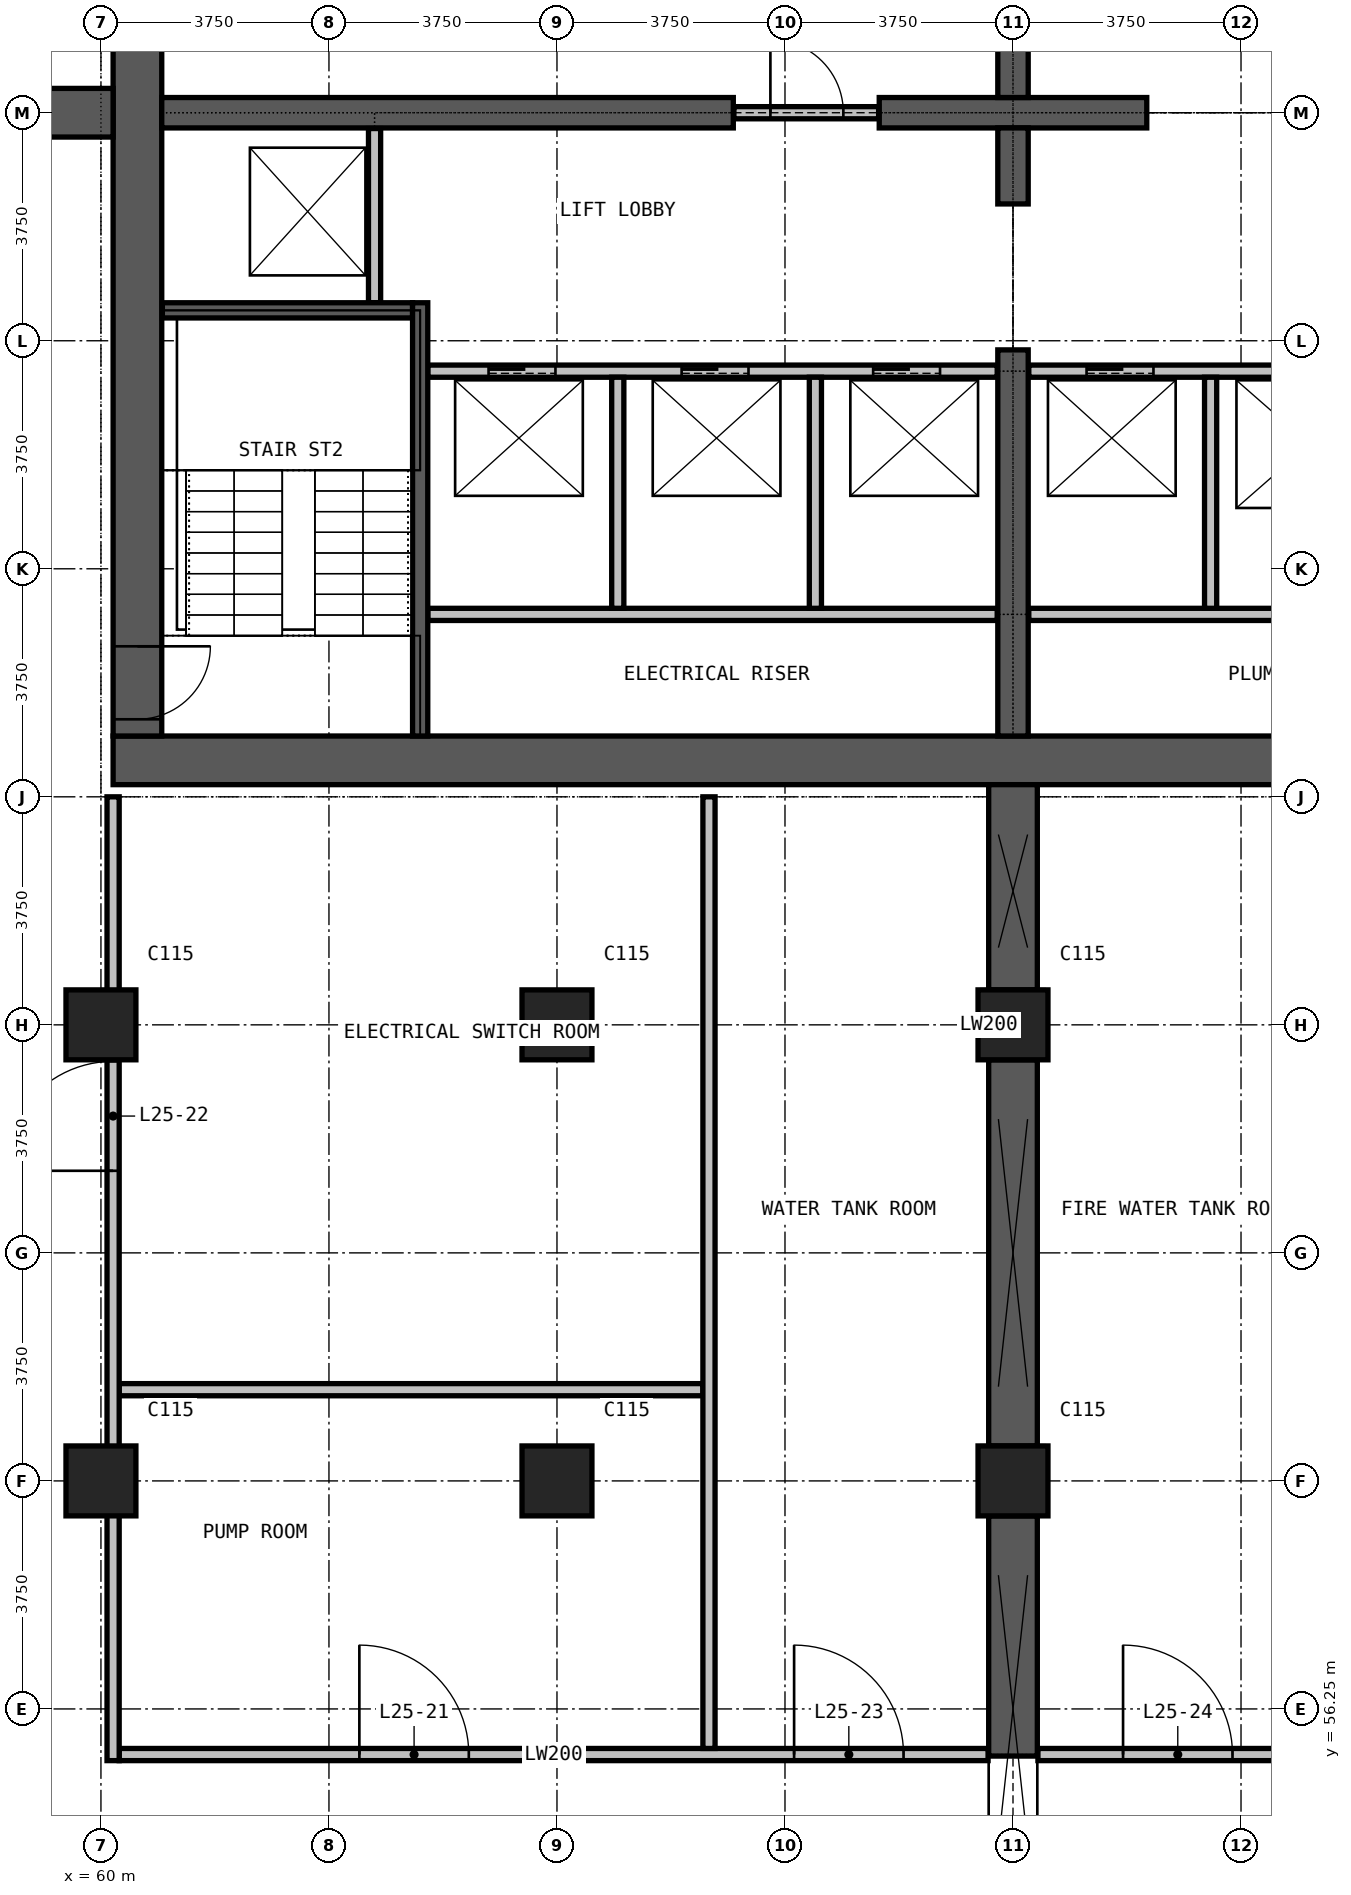
"""IFC4 building model, lengths in metres.
Left out: names, types, materials, properties, quantities, classifications, styles, units other than length and angle.
Written with IfcOpenShell. Run it as: python <this file> out.ifc"""

import sys

from ifc_helpers import new_model, si_unit, direction, frame, frame_2d, origin, origin_2d, place, context, subcontext, project, spatial, rectangle, extrude, element, fill, save


model = new_model("IFC4")
c1 = context("Model", 3, precision=1e-05, world=origin(), true_north=direction((0.0, 1.0)))
c2 = subcontext(c1, "Body", "Model", "MODEL_VIEW")
j1 = project(units=[si_unit("LENGTHUNIT", "METRE"), si_unit("PLANEANGLEUNIT", "RADIAN")], contexts=[c1])
p1 = place(None, origin())
s1 = spatial("IfcSite", under=j1, at=p1, CompositionType="ELEMENT")
p2 = place(p1, origin())
s2 = spatial("IfcBuilding", under=s1, at=p2, CompositionType="ELEMENT")
p3 = place(p2, frame((0.0, 0.0, 102.2)))
s3 = spatial("IfcBuildingStorey", under=s2, at=p3, CompositionType="ELEMENT", Elevation=102.2)
for number, where, z_axis, x_axis in (
    (1, (60.0, 60.0, 0.0), (0.0, 0.0, 1.0), (1.0, 0.0, 0.0)),
    (2, (60.0, 67.5, 0.0), (0.0, 0.0, 1.0), (1.0, 0.0, 0.0)),
    (3, (67.5, 60.0, 0.0), (0.0, 0.0, 1.0), (1.0, 0.0, 0.0)),
    (4, (67.5, 67.5, 0.0), (0.0, 0.0, 1.0), (1.0, 0.0, 0.0)),
    (5, (75.0, 60.0, 0.0), (0.0, 0.0, 1.0), (1.0, 0.0, 0.0)),
    (6, (75.0, 67.5, 0.0), (0.0, 0.0, 1.0), (1.0, 0.0, 0.0)),
):
    element("IfcColumn", number, at=place(p3, frame(where, z_axis=z_axis, x_axis=x_axis)), inside=s3, PredefinedType="COLUMN", context=c2, shape_type="SweptSolid", body=[
        extrude(rectangle(XDim=1.15, YDim=1.15, at=origin_2d()), origin(), (0.0, 0.0, 1.0), 5.0),
    ])
p4 = place(p3, frame((60.2, 71.85, 0.0), z_axis=(0.0, 0.0, 1.0), x_axis=(1.0, 0.0, 0.0)))
e7 = element("IfcWall", 7, at=p4, inside=s3, PredefinedType="SHEAR", context=c2, shape_type="SweptSolid", body=[
    extrude(rectangle(XDim=29.6, YDim=0.8, at=frame_2d((14.8, 0.0))), origin(), (0.0, 0.0, 1.0), 5.0),
])
p5 = place(p3, frame((60.6, 92.75, 0.0), z_axis=(0.0, 0.0, 1.0), x_axis=(0.0, -1.0, 0.0)))
e8 = element("IfcWall", 8, at=p5, inside=s3, PredefinedType="SHEAR", context=c2, shape_type="SweptSolid", body=[
    extrude(rectangle(XDim=20.5, YDim=0.8, at=frame_2d((10.25, 0.0))), origin(), (0.0, 0.0, 1.0), 5.0),
])
p6 = place(p5, frame((19.025, 0.0, 0.0)))
e9 = element("IfcOpeningElement", 9, at=p6, cuts=e8, PredefinedType="OPENING", context=c2, shape_type="SweptSolid", body=[
    extrude(rectangle(XDim=1.2, YDim=2.2, at=frame_2d((0.6, 1.1))), frame((0.0, 0.41, 0.0), z_axis=(0.0, -1.0, 0.0), x_axis=(1.0, 0.0, 0.0)), (0.0, 0.0, 1.0), 0.82),
])
p7 = place(p5, frame((8.025, 0.0, 0.0)))
e10 = element("IfcOpeningElement", 10, at=p7, cuts=e8, PredefinedType="OPENING", context=c2, shape_type="SweptSolid", body=[
    extrude(rectangle(XDim=1.2, YDim=2.2, at=frame_2d((0.6, 1.1))), frame((0.0, 0.41, 0.0), z_axis=(0.0, -1.0, 0.0), x_axis=(1.0, 0.0, 0.0)), (0.0, 0.0, 1.0), 0.82),
])
p8 = place(p3, frame((61.0, 82.5, 0.0), z_axis=(0.0, 0.0, 1.0), x_axis=(1.0, 0.0, 0.0)))
e11 = element("IfcWall", 11, at=p8, inside=s3, PredefinedType="SHEAR", context=c2, shape_type="SweptSolid", body=[
    extrude(rectangle(XDim=9.4, YDim=0.5, at=frame_2d((4.7, 0.0))), origin(), (0.0, 0.0, 1.0), 5.0),
])
p9 = place(p3, frame((72.8, 82.5, 0.0), z_axis=(0.0, 0.0, 1.0), x_axis=(1.0, 0.0, 0.0)))
e12 = element("IfcWall", 12, at=p9, inside=s3, PredefinedType="SHEAR", context=c2, shape_type="SweptSolid", body=[
    extrude(rectangle(XDim=4.4, YDim=0.5, at=frame_2d((2.2, 0.0))), origin(), (0.0, 0.0, 1.0), 5.0),
])
p10 = place(p3, frame((75.0, 72.25, 0.0), z_axis=(0.0, 0.0, 1.0), x_axis=(0.0, 1.0, 0.0)))
e13 = element("IfcWall", 13, at=p10, inside=s3, PredefinedType="SHEAR", context=c2, shape_type="SweptSolid", body=[
    extrude(rectangle(XDim=6.35, YDim=0.5, at=frame_2d((3.175, 0.0))), origin(), (0.0, 0.0, 1.0), 5.0),
])
for number, where, z_axis, x_axis in (
    (14, (75.0, 81.0, 0.0), (0.0, 0.0, 1.0), (0.0, 1.0, 0.0)),
    (15, (75.0, 82.75, 0.0), (0.0, 0.0, 1.0), (0.0, 1.0, 0.0)),
):
    element("IfcWall", number, at=place(p3, frame(where, z_axis=z_axis, x_axis=x_axis)), inside=s3, PredefinedType="SHEAR", context=c2, shape_type="SweptSolid", body=[
        extrude(rectangle(XDim=1.25, YDim=0.5, at=frame_2d((0.625, 0.0))), origin(), (0.0, 0.0, 1.0), 5.0),
    ])
p11 = place(p3, frame((57.875, 82.5, 0.0), z_axis=(0.0, 0.0, 1.0), x_axis=(1.0, 0.0, 0.0)))
e16 = element("IfcWall", 16, at=p11, inside=s3, PredefinedType="SHEAR", context=c2, shape_type="SweptSolid", body=[
    extrude(rectangle(XDim=2.325, YDim=0.8, at=frame_2d((1.163, 0.0))), origin(), (0.0, 0.0, 1.0), 4.7),
])
p12 = place(p3, frame((75.0, 55.475, 0.0), z_axis=(0.0, 0.0, 1.0), x_axis=(0.0, 1.0, 0.0)))
e17 = element("IfcWall", 17, at=p12, inside=s3, PredefinedType="SHEAR", context=c2, shape_type="SweptSolid", body=[
    extrude(rectangle(XDim=3.95, YDim=0.8, at=frame_2d((1.975, 0.0))), origin(), (0.0, 0.0, 1.0), 4.7),
])
p13 = place(p3, frame((75.0, 60.575, 0.0), z_axis=(0.0, 0.0, 1.0), x_axis=(0.0, 1.0, 0.0)))
e18 = element("IfcWall", 18, at=p13, inside=s3, PredefinedType="SHEAR", context=c2, shape_type="SweptSolid", body=[
    extrude(rectangle(XDim=6.35, YDim=0.8, at=frame_2d((3.175, 0.0))), origin(), (0.0, 0.0, 1.0), 4.7),
])
p14 = place(p3, frame((75.0, 68.075, 0.0), z_axis=(0.0, 0.0, 1.0), x_axis=(0.0, 1.0, 0.0)))
e19 = element("IfcWall", 19, at=p14, inside=s3, PredefinedType="SHEAR", context=c2, shape_type="SweptSolid", body=[
    extrude(rectangle(XDim=3.375, YDim=0.8, at=frame_2d((1.688, 0.0))), origin(), (0.0, 0.0, 1.0), 4.7),
])
p15 = place(p3, frame((60.3, 55.5, 0.0), z_axis=(0.0, 0.0, 1.0), x_axis=(1.0, 0.0, 0.0)))
e20 = element("IfcWall", 20, at=p15, inside=s3, PredefinedType="PARTITIONING", context=c2, shape_type="SweptSolid", body=[
    extrude(rectangle(XDim=14.29, YDim=0.2, at=frame_2d((7.145, 0.0))), origin(), (0.0, 0.0, 1.0), 4.7),
])
p16 = place(p15, frame((3.95, 0.0, 0.0)))
e21 = element("IfcOpeningElement", 21, at=p16, cuts=e20, PredefinedType="OPENING", context=c2, shape_type="SweptSolid", body=[
    extrude(rectangle(XDim=1.8, YDim=2.4, at=frame_2d((0.9, 1.2))), frame((0.0, 0.11, 0.0), z_axis=(0.0, -1.0, 0.0), x_axis=(1.0, 0.0, 0.0)), (0.0, 0.0, 1.0), 0.22),
])
p17 = place(p15, frame((11.1, 0.0, 0.0)))
e22 = element("IfcOpeningElement", 22, at=p17, cuts=e20, PredefinedType="OPENING", context=c2, shape_type="SweptSolid", body=[
    extrude(rectangle(XDim=1.8, YDim=2.4, at=frame_2d((0.9, 1.2))), frame((0.0, 0.11, 0.0), z_axis=(0.0, -1.0, 0.0), x_axis=(1.0, 0.0, 0.0)), (0.0, 0.0, 1.0), 0.22),
])
p18 = place(p3, frame((75.41, 55.5, 0.0), z_axis=(0.0, 0.0, 1.0), x_axis=(1.0, 0.0, 0.0)))
e23 = element("IfcWall", 23, at=p18, inside=s3, PredefinedType="PARTITIONING", context=c2, shape_type="SweptSolid", body=[
    extrude(rectangle(XDim=14.29, YDim=0.2, at=frame_2d((7.145, 0.0))), origin(), (0.0, 0.0, 1.0), 4.7),
])
p19 = place(p18, frame((1.4, 0.0, 0.0)))
e24 = element("IfcOpeningElement", 24, at=p19, cuts=e23, PredefinedType="OPENING", context=c2, shape_type="SweptSolid", body=[
    extrude(rectangle(XDim=1.8, YDim=2.4, at=frame_2d((0.9, 1.2))), frame((0.0, 0.11, 0.0), z_axis=(0.0, -1.0, 0.0), x_axis=(1.0, 0.0, 0.0)), (0.0, 0.0, 1.0), 0.22),
])
p20 = place(p18, frame((8.54, 0.0, 0.0)))
e25 = element("IfcOpeningElement", 25, at=p20, cuts=e23, PredefinedType="OPENING", context=c2, shape_type="SweptSolid", body=[
    extrude(rectangle(XDim=1.8, YDim=2.4, at=frame_2d((0.9, 1.2))), frame((0.0, 0.11, 0.0), z_axis=(0.0, -1.0, 0.0), x_axis=(1.0, 0.0, 0.0)), (0.0, 0.0, 1.0), 0.22),
])
p21 = place(p3, frame((60.3, 61.5, 0.0), z_axis=(0.0, 0.0, 1.0), x_axis=(1.0, 0.0, 0.0)))
e26 = element("IfcWall", 26, at=p21, inside=s3, PredefinedType="PARTITIONING", context=c2, shape_type="SweptSolid", body=[
    extrude(rectangle(XDim=9.6, YDim=0.2, at=frame_2d((4.8, 0.0))), origin(), (0.0, 0.0, 1.0), 4.7),
])
p22 = place(p3, frame((70.41, 82.5, 0.0), z_axis=(0.0, 0.0, 1.0), x_axis=(1.0, 0.0, 0.0)))
e27 = element("IfcWall", 27, at=p22, inside=s3, PredefinedType="PARTITIONING", context=c2, shape_type="SweptSolid", body=[
    extrude(rectangle(XDim=2.38, YDim=0.2, at=frame_2d((1.19, 0.0))), origin(), (0.0, 0.0, 1.0), 2.4),
])
p23 = place(p22, frame((0.6, 0.0, 0.0)))
e28 = element("IfcOpeningElement", 28, at=p23, cuts=e27, PredefinedType="OPENING", context=c2, shape_type="SweptSolid", body=[
    extrude(rectangle(XDim=1.2, YDim=2.2, at=frame_2d((0.6, 1.1))), frame((0.0, 0.11, 0.0), z_axis=(0.0, -1.0, 0.0), x_axis=(1.0, 0.0, 0.0)), (0.0, 0.0, 1.0), 0.22),
])
p24 = place(p3, frame((60.2, 55.4, 0.0), z_axis=(0.0, 0.0, 1.0), x_axis=(0.0, 1.0, 0.0)))
e29 = element("IfcWall", 29, at=p24, inside=s3, PredefinedType="PARTITIONING", context=c2, shape_type="SweptSolid", body=[
    extrude(rectangle(XDim=15.85, YDim=0.2, at=frame_2d((7.925, 0.0))), origin(), (0.0, 0.0, 1.0), 4.7),
])
p25 = place(p24, frame((9.7, 0.0, 0.0)))
e30 = element("IfcOpeningElement", 30, at=p25, cuts=e29, PredefinedType="OPENING", context=c2, shape_type="SweptSolid", body=[
    extrude(rectangle(XDim=1.8, YDim=2.4, at=frame_2d((0.9, 1.2))), frame((0.0, 0.11, 0.0), z_axis=(0.0, -1.0, 0.0), x_axis=(1.0, 0.0, 0.0)), (0.0, 0.0, 1.0), 0.22),
])
p26 = place(p3, frame((70.0, 55.6, 0.0), z_axis=(0.0, 0.0, 1.0), x_axis=(0.0, 1.0, 0.0)))
e31 = element("IfcWall", 31, at=p26, inside=s3, PredefinedType="PARTITIONING", context=c2, shape_type="SweptSolid", body=[
    extrude(rectangle(XDim=15.65, YDim=0.2, at=frame_2d((7.825, 0.0))), origin(), (0.0, 0.0, 1.0), 4.7),
])
for number, where, z_axis, x_axis in (
    (32, (74.6, 59.435, 0.0), (0.0, 0.0, 1.0), (0.0, 1.0, 0.0)),
    (33, (74.6, 66.935, 0.0), (0.0, 0.0, 1.0), (0.0, 1.0, 0.0)),
    (34, (75.4, 59.435, 0.0), (0.0, 0.0, 1.0), (0.0, 1.0, 0.0)),
    (35, (75.4, 66.935, 0.0), (0.0, 0.0, 1.0), (0.0, 1.0, 0.0)),
):
    element("IfcWall", number, at=place(p3, frame(where, z_axis=z_axis, x_axis=x_axis)), inside=s3, PredefinedType="PARTITIONING", context=c2, shape_type="SweptSolid", body=[
        extrude(rectangle(XDim=1.13, YDim=0.2, at=frame_2d((0.565, 0.0))), origin(), (0.0, 0.0, 1.0), 4.7),
    ])
for number, where, z_axis, x_axis in (
    (36, (65.375, 74.25, 0.0), (0.0, 0.0, 1.0), (1.0, 0.0, 0.0)),
    (37, (75.26, 74.25, 0.0), (0.0, 0.0, 1.0), (1.0, 0.0, 0.0)),
):
    element("IfcWall", number, at=place(p3, frame(where, z_axis=z_axis, x_axis=x_axis)), inside=s3, PredefinedType="PARTITIONING", context=c2, shape_type="SweptSolid", body=[
        extrude(rectangle(XDim=9.365, YDim=0.2, at=frame_2d((4.683, 0.0))), origin(), (0.0, 0.0, 1.0), 4.7),
    ])
p27 = place(p3, frame((65.375, 78.25, 0.0), z_axis=(0.0, 0.0, 1.0), x_axis=(1.0, 0.0, 0.0)))
e38 = element("IfcWall", 38, at=p27, inside=s3, PredefinedType="PARTITIONING", context=c2, shape_type="SweptSolid", body=[
    extrude(rectangle(XDim=9.365, YDim=0.2, at=frame_2d((4.683, 0.0))), origin(), (0.0, 0.0, 1.0), 4.7),
])
p28 = place(p27, frame((1.0, 0.0, 0.0)))
e39 = element("IfcOpeningElement", 39, at=p28, cuts=e38, PredefinedType="OPENING", context=c2, shape_type="SweptSolid", body=[
    extrude(rectangle(XDim=1.1, YDim=2.2, at=frame_2d((0.55, 1.1))), frame((0.0, 0.11, 0.0), z_axis=(0.0, -1.0, 0.0), x_axis=(1.0, 0.0, 0.0)), (0.0, 0.0, 1.0), 0.22),
])
p29 = place(p27, frame((4.175, 0.0, 0.0)))
e40 = element("IfcOpeningElement", 40, at=p29, cuts=e38, PredefinedType="OPENING", context=c2, shape_type="SweptSolid", body=[
    extrude(rectangle(XDim=1.1, YDim=2.2, at=frame_2d((0.55, 1.1))), frame((0.0, 0.11, 0.0), z_axis=(0.0, -1.0, 0.0), x_axis=(1.0, 0.0, 0.0)), (0.0, 0.0, 1.0), 0.22),
])
p30 = place(p27, frame((7.325, 0.0, 0.0)))
e41 = element("IfcOpeningElement", 41, at=p30, cuts=e38, PredefinedType="OPENING", context=c2, shape_type="SweptSolid", body=[
    extrude(rectangle(XDim=1.1, YDim=2.2, at=frame_2d((0.55, 1.1))), frame((0.0, 0.11, 0.0), z_axis=(0.0, -1.0, 0.0), x_axis=(1.0, 0.0, 0.0)), (0.0, 0.0, 1.0), 0.22),
])
p31 = place(p3, frame((75.26, 78.25, 0.0), z_axis=(0.0, 0.0, 1.0), x_axis=(1.0, 0.0, 0.0)))
e42 = element("IfcWall", 42, at=p31, inside=s3, PredefinedType="PARTITIONING", context=c2, shape_type="SweptSolid", body=[
    extrude(rectangle(XDim=9.365, YDim=0.2, at=frame_2d((4.683, 0.0))), origin(), (0.0, 0.0, 1.0), 4.7),
])
p32 = place(p31, frame((0.95, 0.0, 0.0)))
e43 = element("IfcOpeningElement", 43, at=p32, cuts=e42, PredefinedType="OPENING", context=c2, shape_type="SweptSolid", body=[
    extrude(rectangle(XDim=1.1, YDim=2.2, at=frame_2d((0.55, 1.1))), frame((0.0, 0.11, 0.0), z_axis=(0.0, -1.0, 0.0), x_axis=(1.0, 0.0, 0.0)), (0.0, 0.0, 1.0), 0.22),
])
p33 = place(p3, frame((64.5, 79.375, 0.0), z_axis=(0.0, 0.0, 1.0), x_axis=(0.0, 1.0, 0.0)))
e44 = element("IfcWall", 44, at=p33, inside=s3, PredefinedType="PARTITIONING", context=c2, shape_type="SweptSolid", body=[
    extrude(rectangle(XDim=2.865, YDim=0.2, at=frame_2d((1.433, 0.0))), origin(), (0.0, 0.0, 1.0), 4.7),
])
for number, where, z_axis, x_axis in (
    (45, (68.5, 74.35, 0.0), (0.0, 0.0, 1.0), (0.0, 1.0, 0.0)),
    (46, (71.75, 74.35, 0.0), (0.0, 0.0, 1.0), (0.0, 1.0, 0.0)),
    (47, (78.25, 74.35, 0.0), (0.0, 0.0, 1.0), (0.0, 1.0, 0.0)),
):
    element("IfcWall", number, at=place(p3, frame(where, z_axis=z_axis, x_axis=x_axis)), inside=s3, PredefinedType="PARTITIONING", context=c2, shape_type="SweptSolid", body=[
        extrude(rectangle(XDim=3.8, YDim=0.2, at=frame_2d((1.9, 0.0))), origin(), (0.0, 0.0, 1.0), 4.7),
    ])
p34 = place(p3, frame((61.01, 79.25, 0.0), z_axis=(0.0, 0.0, 1.0), x_axis=(1.0, 0.0, 0.0)))
e48 = element("IfcWall", 48, at=p34, inside=s3, PredefinedType="PARTITIONING", context=c2, shape_type="SweptSolid", body=[
    extrude(rectangle(XDim=4.115, YDim=0.25, at=frame_2d((2.058, 0.0))), origin(), (0.0, 0.0, 1.0), 4.7),
])
p35 = place(p3, frame((65.25, 72.25, 0.0), z_axis=(0.0, 0.0, 1.0), x_axis=(0.0, 1.0, 0.0)))
e49 = element("IfcWall", 49, at=p35, inside=s3, PredefinedType="PARTITIONING", context=c2, shape_type="SweptSolid", body=[
    extrude(rectangle(XDim=7.125, YDim=0.25, at=frame_2d((3.562, 0.0))), origin(), (0.0, 0.0, 1.0), 4.7),
])
p36 = place(p28, origin())
e50 = element("IfcDoor", 50, at=p36, inside=s3, OperationType="DOUBLE_DOOR_SLIDING", PredefinedType="DOOR", context=c2, shape_type="SweptSolid", body=[
    extrude(rectangle(XDim=1.1, YDim=2.2, at=frame_2d((0.55, 1.1))), frame((0.0, 0.025, 0.0), z_axis=(0.0, -1.0, 0.0), x_axis=(1.0, 0.0, 0.0)), (0.0, 0.0, 1.0), 0.05),
])
fill(e39, e50)
p37 = place(p29, origin())
e51 = element("IfcDoor", 51, at=p37, inside=s3, OperationType="DOUBLE_DOOR_SLIDING", PredefinedType="DOOR", context=c2, shape_type="SweptSolid", body=[
    extrude(rectangle(XDim=1.1, YDim=2.2, at=frame_2d((0.55, 1.1))), frame((0.0, 0.025, 0.0), z_axis=(0.0, -1.0, 0.0), x_axis=(1.0, 0.0, 0.0)), (0.0, 0.0, 1.0), 0.05),
])
fill(e40, e51)
p38 = place(p30, origin())
e52 = element("IfcDoor", 52, at=p38, inside=s3, OperationType="DOUBLE_DOOR_SLIDING", PredefinedType="DOOR", context=c2, shape_type="SweptSolid", body=[
    extrude(rectangle(XDim=1.1, YDim=2.2, at=frame_2d((0.55, 1.1))), frame((0.0, 0.025, 0.0), z_axis=(0.0, -1.0, 0.0), x_axis=(1.0, 0.0, 0.0)), (0.0, 0.0, 1.0), 0.05),
])
fill(e41, e52)
p39 = place(p32, origin())
e53 = element("IfcDoor", 53, at=p39, inside=s3, OperationType="DOUBLE_DOOR_SLIDING", PredefinedType="DOOR", context=c2, shape_type="SweptSolid", body=[
    extrude(rectangle(XDim=1.1, YDim=2.2, at=frame_2d((0.55, 1.1))), frame((0.0, 0.025, 0.0), z_axis=(0.0, -1.0, 0.0), x_axis=(1.0, 0.0, 0.0)), (0.0, 0.0, 1.0), 0.05),
])
fill(e43, e53)
p40 = place(p23, origin())
e54 = element("IfcDoor", 54, at=p40, inside=s3, OperationType="SINGLE_SWING_LEFT", PredefinedType="DOOR", context=c2, shape_type="SweptSolid", body=[
    extrude(rectangle(XDim=1.2, YDim=2.2, at=frame_2d((0.6, 1.1))), frame((0.0, 0.025, 0.0), z_axis=(0.0, -1.0, 0.0), x_axis=(1.0, 0.0, 0.0)), (0.0, 0.0, 1.0), 0.05),
])
fill(e28, e54)
p41 = place(p6, origin())
e55 = element("IfcDoor", 55, at=p41, inside=s3, OperationType="SINGLE_SWING_LEFT", PredefinedType="DOOR", context=c2, shape_type="SweptSolid", body=[
    extrude(rectangle(XDim=1.2, YDim=2.2, at=frame_2d((0.6, 1.1))), frame((0.0, 0.025, 0.0), z_axis=(0.0, -1.0, 0.0), x_axis=(1.0, 0.0, 0.0)), (0.0, 0.0, 1.0), 0.05),
])
fill(e9, e55)
p42 = place(p16, origin())
e56 = element("IfcDoor", 56, at=p42, inside=s3, OperationType="DOUBLE_DOOR_SINGLE_SWING", PredefinedType="DOOR", context=c2, shape_type="SweptSolid", body=[
    extrude(rectangle(XDim=1.8, YDim=2.4, at=frame_2d((0.9, 1.2))), frame((0.0, 0.025, 0.0), z_axis=(0.0, -1.0, 0.0), x_axis=(1.0, 0.0, 0.0)), (0.0, 0.0, 1.0), 0.05),
])
fill(e21, e56)
p43 = place(p25, origin())
e57 = element("IfcDoor", 57, at=p43, inside=s3, OperationType="DOUBLE_DOOR_SINGLE_SWING", PredefinedType="DOOR", context=c2, shape_type="SweptSolid", body=[
    extrude(rectangle(XDim=1.8, YDim=2.4, at=frame_2d((0.9, 1.2))), frame((0.0, 0.025, 0.0), z_axis=(0.0, -1.0, 0.0), x_axis=(1.0, 0.0, 0.0)), (0.0, 0.0, 1.0), 0.05),
])
fill(e30, e57)
p44 = place(p17, origin())
e58 = element("IfcDoor", 58, at=p44, inside=s3, OperationType="DOUBLE_DOOR_SINGLE_SWING", PredefinedType="DOOR", context=c2, shape_type="SweptSolid", body=[
    extrude(rectangle(XDim=1.8, YDim=2.4, at=frame_2d((0.9, 1.2))), frame((0.0, 0.025, 0.0), z_axis=(0.0, -1.0, 0.0), x_axis=(1.0, 0.0, 0.0)), (0.0, 0.0, 1.0), 0.05),
])
fill(e22, e58)
p45 = place(p19, origin())
e59 = element("IfcDoor", 59, at=p45, inside=s3, OperationType="DOUBLE_DOOR_SINGLE_SWING", PredefinedType="DOOR", context=c2, shape_type="SweptSolid", body=[
    extrude(rectangle(XDim=1.8, YDim=2.4, at=frame_2d((0.9, 1.2))), frame((0.0, 0.025, 0.0), z_axis=(0.0, -1.0, 0.0), x_axis=(1.0, 0.0, 0.0)), (0.0, 0.0, 1.0), 0.05),
])
fill(e24, e59)
save(model, sys.argv[1])
